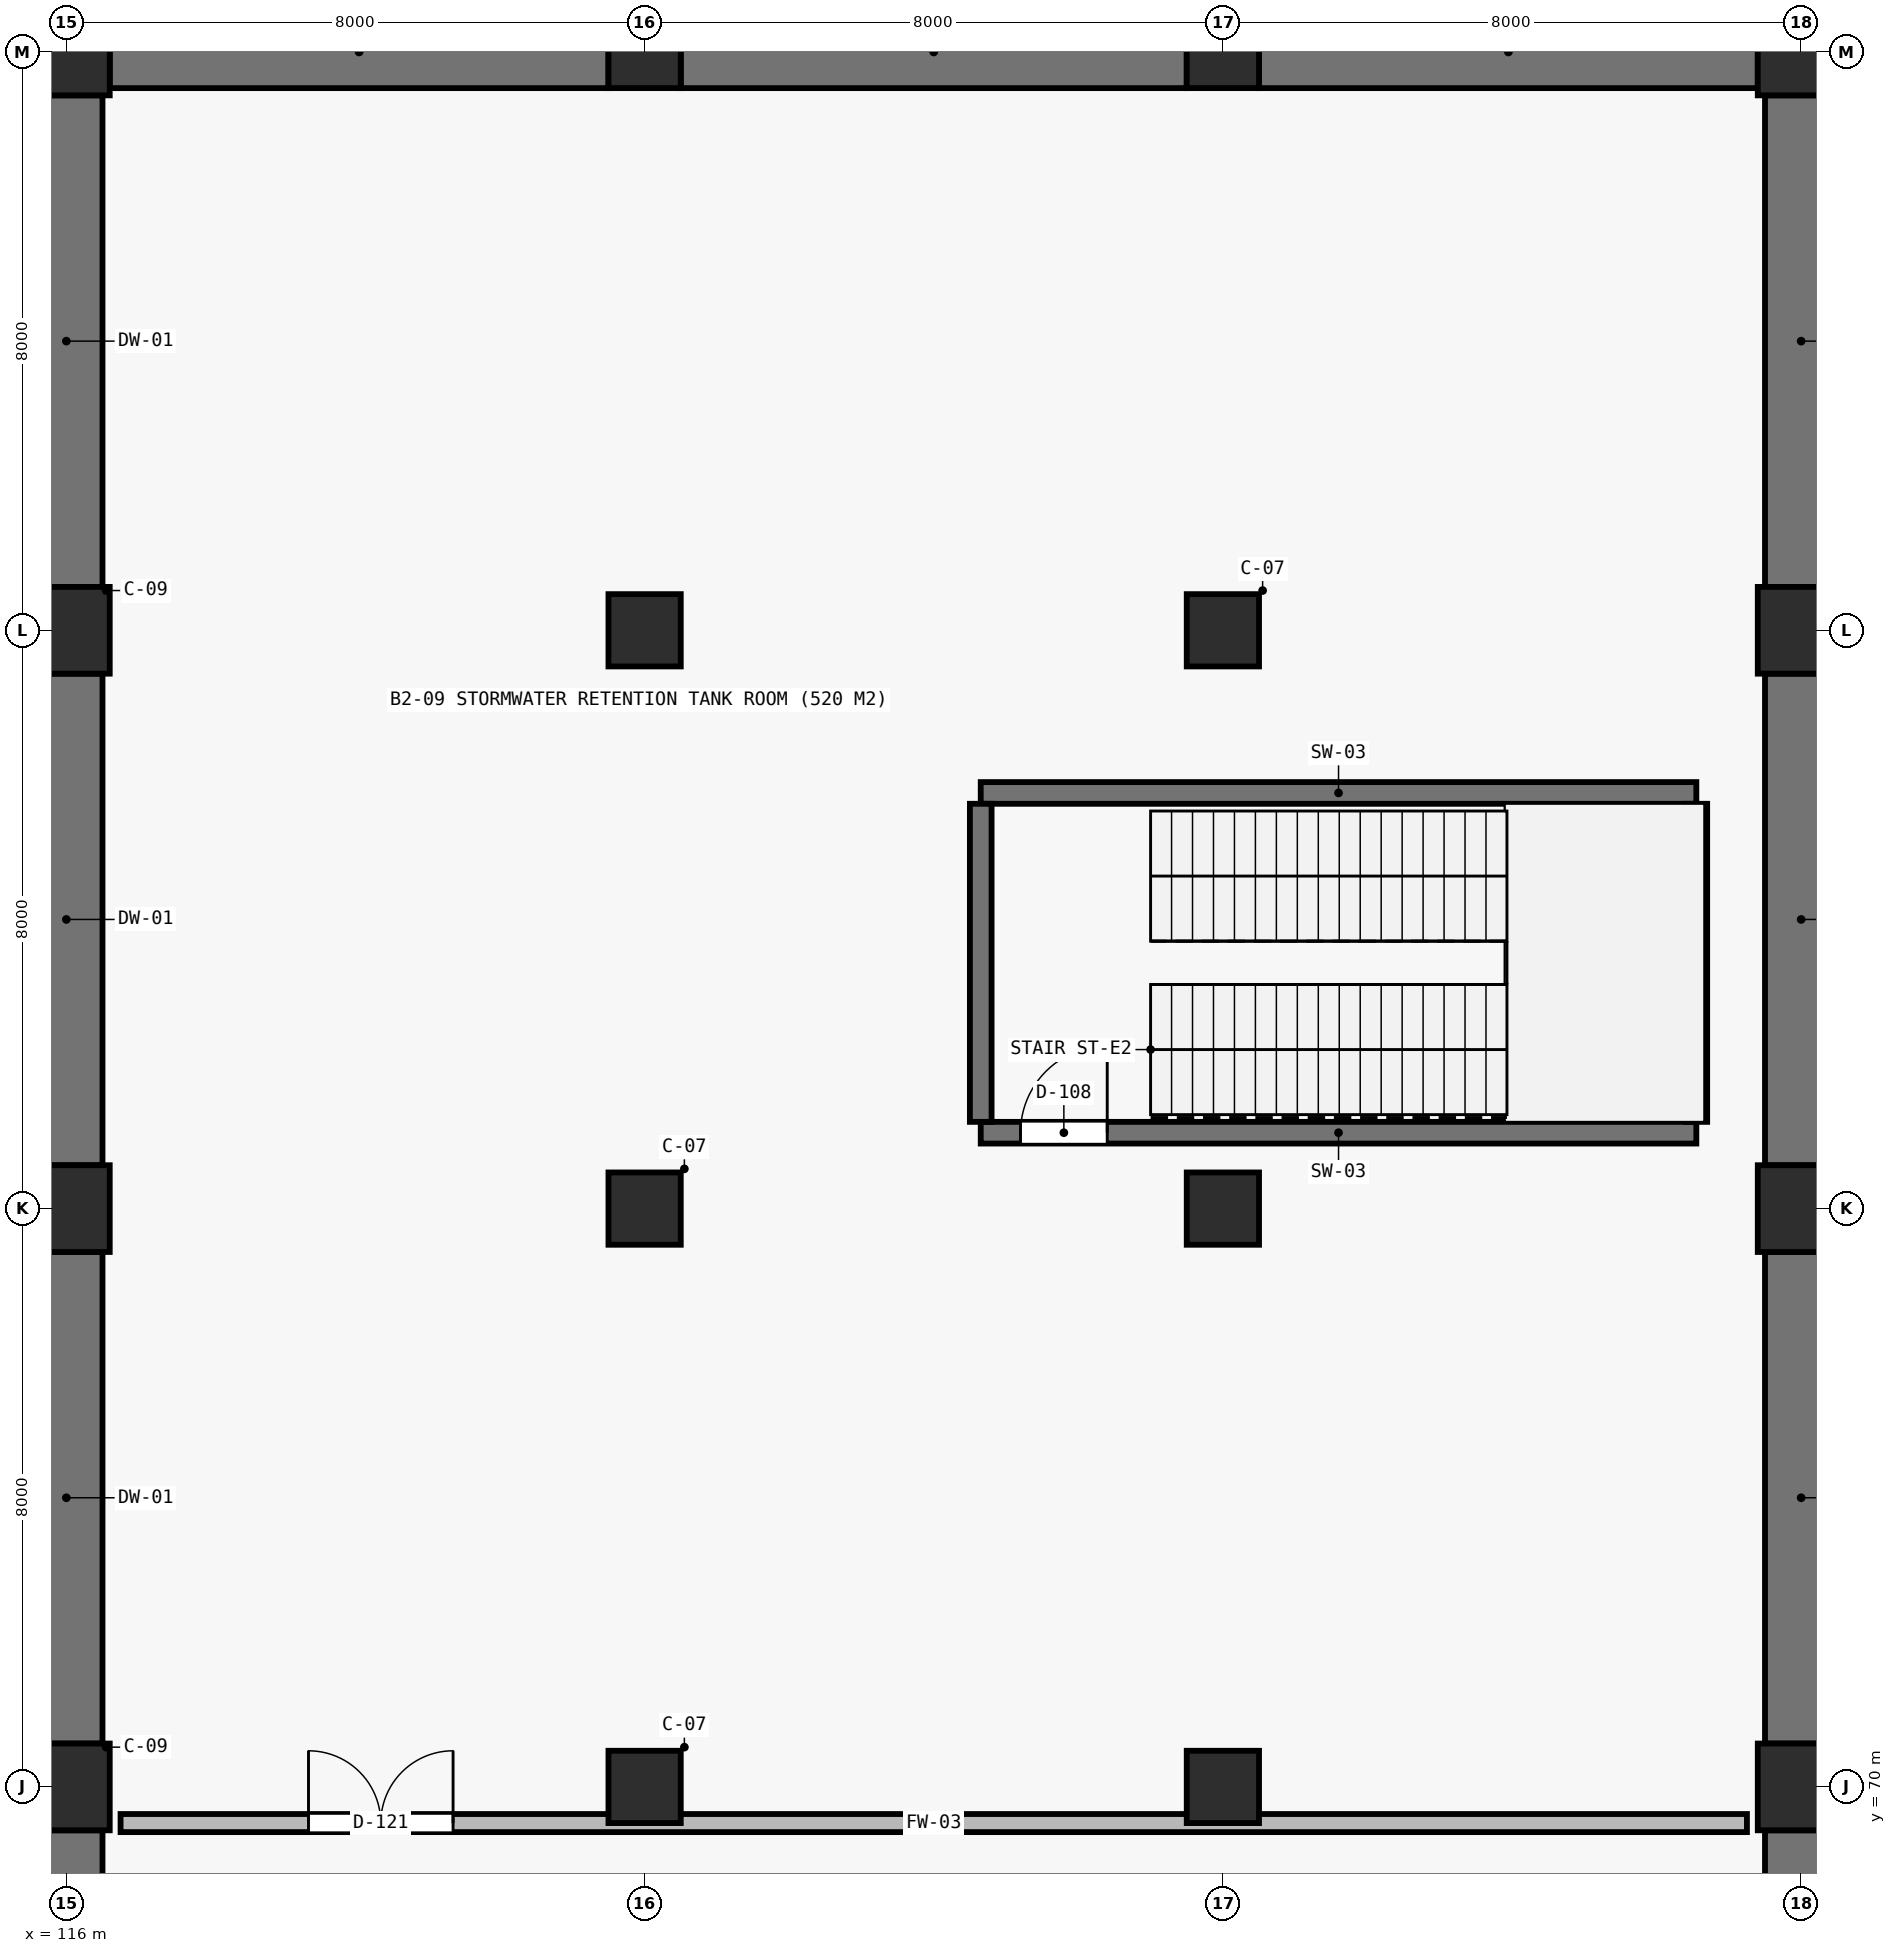
"""IFC4 building model, lengths in metres.
Left out: names, types, materials, properties, quantities, classifications, styles, units other than length and angle.
Written with IfcOpenShell. Run it as: python <this file> out.ifc"""

import sys

from ifc_helpers import new_model, si_unit, direction, frame, frame_2d, origin, origin_2d, place, context, subcontext, project, spatial, rectangle, extrude, element, fill, save


model = new_model("IFC4")
c1 = context("Model", 3, precision=1e-05, world=origin(), true_north=direction((0.0, 1.0)))
c2 = subcontext(c1, "Body", "Model", "MODEL_VIEW")
j1 = project(units=[si_unit("LENGTHUNIT", "METRE"), si_unit("PLANEANGLEUNIT", "RADIAN")], contexts=[c1])
p1 = place(None, origin())
s1 = spatial("IfcSite", under=j1, at=p1, CompositionType="ELEMENT")
p2 = place(p1, origin())
s2 = spatial("IfcBuilding", under=s1, at=p2, CompositionType="ELEMENT")
p3 = place(p2, frame((0.0, 0.0, -12.6)))
s3 = spatial("IfcBuildingStorey", under=s2, at=p3, CompositionType="ELEMENT", Elevation=-12.6)
for number, where, z_axis, x_axis in (
    (1, (116.0, 70.0, 0.0), (0.0, 0.0, 1.0), (1.0, 0.0, 0.0)),
    (2, (116.0, 78.0, 0.0), (0.0, 0.0, 1.0), (1.0, 0.0, 0.0)),
    (3, (116.0, 86.0, 0.0), (0.0, 0.0, 1.0), (1.0, 0.0, 0.0)),
    (4, (116.0, 94.0, 0.0), (0.0, 0.0, 1.0), (1.0, 0.0, 0.0)),
):
    element("IfcColumn", number, at=place(p3, frame(where, z_axis=z_axis, x_axis=x_axis)), inside=s3, PredefinedType="COLUMN", context=c2, shape_type="SweptSolid", body=[
        extrude(rectangle(XDim=1.2, YDim=1.2, at=origin_2d()), origin(), (0.0, 0.0, 1.0), 5.9),
    ])
for number, where, z_axis, x_axis in (
    (5, (124.0, 70.0, 0.0), (0.0, 0.0, 1.0), (1.0, 0.0, 0.0)),
    (6, (124.0, 78.0, 0.0), (0.0, 0.0, 1.0), (1.0, 0.0, 0.0)),
    (7, (124.0, 86.0, 0.0), (0.0, 0.0, 1.0), (1.0, 0.0, 0.0)),
    (8, (124.0, 94.0, 0.0), (0.0, 0.0, 1.0), (1.0, 0.0, 0.0)),
    (9, (132.0, 70.0, 0.0), (0.0, 0.0, 1.0), (1.0, 0.0, 0.0)),
    (10, (132.0, 78.0, 0.0), (0.0, 0.0, 1.0), (1.0, 0.0, 0.0)),
    (11, (132.0, 86.0, 0.0), (0.0, 0.0, 1.0), (1.0, 0.0, 0.0)),
    (12, (132.0, 94.0, 0.0), (0.0, 0.0, 1.0), (1.0, 0.0, 0.0)),
):
    element("IfcColumn", number, at=place(p3, frame(where, z_axis=z_axis, x_axis=x_axis)), inside=s3, PredefinedType="COLUMN", context=c2, shape_type="SweptSolid", body=[
        extrude(rectangle(XDim=1.0, YDim=1.0, at=origin_2d()), origin(), (0.0, 0.0, 1.0), 5.9),
    ])
for number, where, z_axis, x_axis in (
    (13, (140.0, 70.0, 0.0), (0.0, 0.0, 1.0), (1.0, 0.0, 0.0)),
    (14, (140.0, 78.0, 0.0), (0.0, 0.0, 1.0), (1.0, 0.0, 0.0)),
    (15, (140.0, 86.0, 0.0), (0.0, 0.0, 1.0), (1.0, 0.0, 0.0)),
    (16, (140.0, 94.0, 0.0), (0.0, 0.0, 1.0), (1.0, 0.0, 0.0)),
):
    element("IfcColumn", number, at=place(p3, frame(where, z_axis=z_axis, x_axis=x_axis)), inside=s3, PredefinedType="COLUMN", context=c2, shape_type="SweptSolid", body=[
        extrude(rectangle(XDim=1.2, YDim=1.2, at=origin_2d()), origin(), (0.0, 0.0, 1.0), 5.9),
    ])
for number, where, z_axis, x_axis in (
    (17, (140.0, 62.6, 0.0), (0.0, 0.0, 1.0), (0.0, 1.0, 0.0)),
    (18, (140.0, 70.6, 0.0), (0.0, 0.0, 1.0), (0.0, 1.0, 0.0)),
    (19, (140.0, 78.6, 0.0), (0.0, 0.0, 1.0), (0.0, 1.0, 0.0)),
    (20, (140.0, 86.6, 0.0), (0.0, 0.0, 1.0), (0.0, 1.0, 0.0)),
):
    element("IfcWall", number, at=place(p3, frame(where, z_axis=z_axis, x_axis=x_axis)), inside=s3, PredefinedType="USERDEFINED", context=c2, shape_type="SweptSolid", body=[
        extrude(rectangle(XDim=6.8, YDim=1.0, at=frame_2d((3.4, 0.0))), origin(), (0.0, 0.0, 1.0), 5.9),
    ])
p4 = place(p3, frame((139.4, 94.0, 0.0), z_axis=(0.0, 0.0, 1.0), x_axis=(-1.0, 0.0, 0.0)))
e21 = element("IfcWall", 21, at=p4, inside=s3, PredefinedType="USERDEFINED", context=c2, shape_type="SweptSolid", body=[
    extrude(rectangle(XDim=6.9, YDim=1.0, at=frame_2d((3.45, 0.0))), origin(), (0.0, 0.0, 1.0), 5.9),
])
p5 = place(p3, frame((131.5, 94.0, 0.0), z_axis=(0.0, 0.0, 1.0), x_axis=(-1.0, 0.0, 0.0)))
e22 = element("IfcWall", 22, at=p5, inside=s3, PredefinedType="USERDEFINED", context=c2, shape_type="SweptSolid", body=[
    extrude(rectangle(XDim=7.0, YDim=1.0, at=frame_2d((3.5, 0.0))), origin(), (0.0, 0.0, 1.0), 5.9),
])
p6 = place(p3, frame((123.5, 94.0, 0.0), z_axis=(0.0, 0.0, 1.0), x_axis=(-1.0, 0.0, 0.0)))
e23 = element("IfcWall", 23, at=p6, inside=s3, PredefinedType="USERDEFINED", context=c2, shape_type="SweptSolid", body=[
    extrude(rectangle(XDim=6.9, YDim=1.0, at=frame_2d((3.45, 0.0))), origin(), (0.0, 0.0, 1.0), 5.9),
])
for number, where, z_axis, x_axis in (
    (24, (116.0, 93.4, 0.0), (0.0, 0.0, 1.0), (0.0, -1.0, 0.0)),
    (25, (116.0, 85.4, 0.0), (0.0, 0.0, 1.0), (0.0, -1.0, 0.0)),
    (26, (116.0, 77.4, 0.0), (0.0, 0.0, 1.0), (0.0, -1.0, 0.0)),
    (27, (116.0, 69.4, 0.0), (0.0, 0.0, 1.0), (0.0, -1.0, 0.0)),
):
    element("IfcWall", number, at=place(p3, frame(where, z_axis=z_axis, x_axis=x_axis)), inside=s3, PredefinedType="USERDEFINED", context=c2, shape_type="SweptSolid", body=[
        extrude(rectangle(XDim=6.8, YDim=1.0, at=frame_2d((3.4, 0.0))), origin(), (0.0, 0.0, 1.0), 5.9),
    ])
p7 = place(p3, frame((128.65, 83.75, 0.0), z_axis=(0.0, 0.0, 1.0), x_axis=(1.0, 0.0, 0.0)))
e28 = element("IfcWall", 28, at=p7, inside=s3, PredefinedType="SHEAR", context=c2, shape_type="SweptSolid", body=[
    extrude(rectangle(XDim=9.9, YDim=0.3, at=frame_2d((4.95, 0.0))), origin(), (0.0, 0.0, 1.0), 5.9),
])
p8 = place(p3, frame((128.65, 79.05, 0.0), z_axis=(0.0, 0.0, 1.0), x_axis=(1.0, 0.0, 0.0)))
e29 = element("IfcWall", 29, at=p8, inside=s3, PredefinedType="SHEAR", context=c2, shape_type="SweptSolid", body=[
    extrude(rectangle(XDim=9.9, YDim=0.3, at=frame_2d((4.95, 0.0))), origin(), (0.0, 0.0, 1.0), 5.9),
])
p9 = place(p8, frame((0.55, 0.0, 0.0)))
e30 = element("IfcOpeningElement", 30, at=p9, cuts=e29, PredefinedType="OPENING", context=c2, shape_type="SweptSolid", body=[
    extrude(rectangle(XDim=1.2, YDim=2.2, at=frame_2d((0.6, 1.1))), frame((0.0, 0.16, 0.0), z_axis=(0.0, -1.0, 0.0), x_axis=(1.0, 0.0, 0.0)), (0.0, 0.0, 1.0), 0.32),
])
for number, where, z_axis, x_axis in (
    (31, (128.65, 79.2, 0.0), (0.0, 0.0, 1.0), (0.0, 1.0, 0.0)),
    (32, (138.55, 79.2, 0.0), (0.0, 0.0, 1.0), (0.0, 1.0, 0.0)),
):
    element("IfcWall", number, at=place(p3, frame(where, z_axis=z_axis, x_axis=x_axis)), inside=s3, PredefinedType="SHEAR", context=c2, shape_type="SweptSolid", body=[
        extrude(rectangle(XDim=4.4, YDim=0.3, at=frame_2d((2.2, 0.0))), origin(), (0.0, 0.0, 1.0), 5.9),
    ])
p10 = place(p3, frame((116.75, 69.5, 0.0), z_axis=(0.0, 0.0, 1.0), x_axis=(1.0, 0.0, 0.0)))
e33 = element("IfcWall", 33, at=p10, inside=s3, PredefinedType="SOLIDWALL", context=c2, shape_type="SweptSolid", body=[
    extrude(rectangle(XDim=22.5, YDim=0.25, at=frame_2d((11.25, 0.0))), origin(), (0.0, 0.0, 1.0), 5.9),
])
p11 = place(p10, frame((2.6, 0.0, 0.0)))
e34 = element("IfcOpeningElement", 34, at=p11, cuts=e33, PredefinedType="OPENING", context=c2, shape_type="SweptSolid", body=[
    extrude(rectangle(XDim=2.0, YDim=2.3, at=frame_2d((1.0, 1.15))), frame((0.0, 0.135, 0.0), z_axis=(0.0, -1.0, 0.0), x_axis=(1.0, 0.0, 0.0)), (0.0, 0.0, 1.0), 0.27),
])
p12 = place(p9, origin())
e35 = element("IfcDoor", 35, at=p12, inside=s3, OperationType="SINGLE_SWING_RIGHT", PredefinedType="DOOR", context=c2, shape_type="SweptSolid", body=[
    extrude(rectangle(XDim=1.2, YDim=2.2, at=frame_2d((0.6, 1.1))), frame((0.0, 0.025, 0.0), z_axis=(0.0, -1.0, 0.0), x_axis=(1.0, 0.0, 0.0)), (0.0, 0.0, 1.0), 0.05),
])
fill(e30, e35)
p13 = place(p11, origin())
e36 = element("IfcDoor", 36, at=p13, inside=s3, OperationType="DOUBLE_DOOR_SINGLE_SWING", PredefinedType="DOOR", context=c2, shape_type="SweptSolid", body=[
    extrude(rectangle(XDim=2.0, YDim=2.3, at=frame_2d((1.0, 1.15))), frame((0.0, 0.025, 0.0), z_axis=(0.0, -1.0, 0.0), x_axis=(1.0, 0.0, 0.0)), (0.0, 0.0, 1.0), 0.05),
])
fill(e34, e36)
save(model, sys.argv[1])
